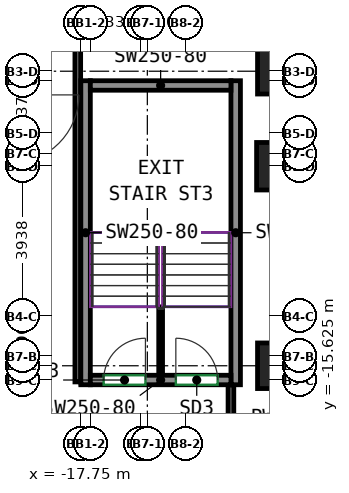
"""IFC4 building model, lengths in metres.
Left out: names, types, materials, properties, quantities, classifications, styles, units other than length and angle.
Written with IfcOpenShell. Run it as: python <this file> out.ifc"""

import sys

from ifc_helpers import new_model, si_unit, direction, frame, frame_2d, origin, origin_2d, place, context, subcontext, project, spatial, rectangle, extrude, source, transform, mapped, element, fill, save


model = new_model("IFC4")
c1 = context("Model", 3, precision=1e-05, world=origin(), true_north=direction((0.0, 1.0)))
c2 = subcontext(c1, "Body", "Model", "MODEL_VIEW")
j1 = project(units=[si_unit("LENGTHUNIT", "METRE"), si_unit("PLANEANGLEUNIT", "RADIAN")], contexts=[c1])
p1 = place(None, origin())
s1 = spatial("IfcSite", under=j1, at=p1, CompositionType="ELEMENT")
p2 = place(p1, origin())
s2 = spatial("IfcBuilding", under=s1, at=p2, CompositionType="ELEMENT")
p3 = place(p2, frame((0.0, 0.0, 95.2)))
s3 = spatial("IfcBuildingStorey", under=s2, at=p3, CompositionType="ELEMENT", Elevation=95.2)
m1 = source(origin(), c2, "Body", "SweptSolid", [
    extrude(rectangle(XDim=1.25, YDim=1.25, at=origin_2d()), origin(), (0.0, 0.0, 1.0), 3.5),
])
p4 = place(p3, frame((-12.5, -10.0, 0.0), z_axis=(0.0, 0.0, 1.0), x_axis=(1.0, 0.0, 0.0)))
e1 = element("IfcColumn", 1, at=p4, inside=s3, PredefinedType="COLUMN", context=c2, shape_type="MappedRepresentation", body=[
    mapped(m1, transform((0.0, 0.0, 0.0))),
])
m2 = source(origin(), c2, "Body", "SweptSolid", [
    extrude(rectangle(XDim=1.2, YDim=1.2, at=origin_2d()), origin(), (0.0, 0.0, 1.0), 5.0),
])
for number, where, z_axis, x_axis in (
    (2, (-12.5, -15.25, 0.0), (0.0, 0.0, 1.0), (1.0, 0.0, 0.0)),
    (3, (-12.5, -7.5, 0.0), (0.0, 0.0, 1.0), (1.0, 0.0, 0.0)),
):
    element("IfcColumn", number, at=place(p3, frame(where, z_axis=z_axis, x_axis=x_axis)), inside=s3, PredefinedType="COLUMN", context=c2, shape_type="MappedRepresentation", body=[
        mapped(m2, transform((0.0, 0.0, 0.0))),
    ])
m3 = source(origin(), c2, "Body", "SweptSolid", [
    extrude(rectangle(XDim=8.0, YDim=0.25, at=frame_2d((4.0, 0.0))), origin(), (0.0, 0.0, 1.0), 5.0),
])
for number, where, z_axis, x_axis in (
    (4, (-17.625, -15.75, 0.0), (0.0, 0.0, 1.0), (0.0, 1.0, 0.0)),
    (5, (-13.675, -15.75, 0.0), (0.0, 0.0, 1.0), (0.0, 1.0, 0.0)),
):
    element("IfcWall", number, at=place(p3, frame(where, z_axis=z_axis, x_axis=x_axis)), inside=s3, PredefinedType="SHEAR", context=c2, shape_type="MappedRepresentation", body=[
        mapped(m3, transform((0.0, 0.0, 0.0))),
    ])
m4 = source(origin(), c2, "Body", "SweptSolid", [
    extrude(rectangle(XDim=3.7, YDim=0.25, at=frame_2d((1.85, 0.0))), origin(), (0.0, 0.0, 1.0), 5.0),
])
p5 = place(p3, frame((-17.5, -15.625, 0.0), z_axis=(0.0, 0.0, 1.0), x_axis=(1.0, 0.0, 0.0)))
e6 = element("IfcWall", 6, at=p5, inside=s3, PredefinedType="SHEAR", context=c2, shape_type="MappedRepresentation", body=[
    mapped(m4, transform((0.0, 0.0, 0.0))),
])
p6 = place(p5, frame((0.35, 0.0, 0.0)))
e7 = element("IfcOpeningElement", 7, at=p6, cuts=e6, PredefinedType="OPENING", context=c2, shape_type="SweptSolid", body=[
    extrude(rectangle(XDim=1.1, YDim=2.1, at=frame_2d((0.55, 1.05))), frame((0.0, 0.135, 0.0), z_axis=(0.0, -1.0, 0.0), x_axis=(1.0, 0.0, 0.0)), (0.0, 0.0, 1.0), 0.27),
])
p7 = place(p5, frame((2.25, 0.0, 0.0)))
e8 = element("IfcOpeningElement", 8, at=p7, cuts=e6, PredefinedType="OPENING", context=c2, shape_type="SweptSolid", body=[
    extrude(rectangle(XDim=1.1, YDim=2.1, at=frame_2d((0.55, 1.05))), frame((0.0, 0.135, 0.0), z_axis=(0.0, -1.0, 0.0), x_axis=(1.0, 0.0, 0.0)), (0.0, 0.0, 1.0), 0.27),
])
p8 = place(p3, frame((-17.5, -7.875, 0.0), z_axis=(0.0, 0.0, 1.0), x_axis=(1.0, 0.0, 0.0)))
e9 = element("IfcWall", 9, at=p8, inside=s3, PredefinedType="SHEAR", context=c2, shape_type="MappedRepresentation", body=[
    mapped(m4, transform((0.0, 0.0, 0.0))),
])
m5 = source(origin(), c2, "Body", "SweptSolid", [
    extrude(rectangle(XDim=1.8, YDim=0.1, at=frame_2d((0.9, 0.0))), origin(), (0.0, 0.0, 1.0), 2.5),
])
p9 = place(p3, frame((-15.65, -15.5, 0.0), z_axis=(0.0, 0.0, 1.0), x_axis=(0.0, 1.0, 0.0)))
e10 = element("IfcWall", 10, at=p9, inside=s3, PredefinedType="PARTITIONING", context=c2, shape_type="MappedRepresentation", body=[
    mapped(m5, transform((0.0, 0.0, 0.0))),
])
p10 = place(p3, frame((-17.83, -15.675, 0.0), z_axis=(0.0, 0.0, 1.0), x_axis=(0.0, 1.0, 0.0)))
e11 = element("IfcWall", 11, at=p10, inside=s3, PredefinedType="PARTITIONING", context=c2, shape_type="SweptSolid", body=[
    extrude(rectangle(XDim=18.8, YDim=0.15, at=frame_2d((9.4, 0.0))), origin(), (0.0, 0.0, 1.0), 5.0),
])
p11 = place(p3, frame((-13.8, -17.475, 0.0), z_axis=(0.0, 0.0, 1.0), x_axis=(0.0, 1.0, 0.0)))
e12 = element("IfcWall", 12, at=p11, inside=s3, PredefinedType="PARTITIONING", context=c2, shape_type="SweptSolid", body=[
    extrude(rectangle(XDim=1.725, YDim=0.15, at=frame_2d((0.863, 0.0))), origin(), (0.0, 0.0, 1.0), 5.0),
])
p12 = place(p6, origin())
e13 = element("IfcDoor", 13, at=p12, inside=s3, OperationType="SINGLE_SWING_RIGHT", PredefinedType="DOOR", context=c2, shape_type="SweptSolid", body=[
    extrude(rectangle(XDim=1.1, YDim=2.1, at=frame_2d((0.55, 1.05))), frame((0.0, 0.025, 0.0), z_axis=(0.0, -1.0, 0.0), x_axis=(1.0, 0.0, 0.0)), (0.0, 0.0, 1.0), 0.05),
])
fill(e7, e13)
p13 = place(p7, origin())
e14 = element("IfcDoor", 14, at=p13, inside=s3, OperationType="SINGLE_SWING_LEFT", PredefinedType="DOOR", context=c2, shape_type="SweptSolid", body=[
    extrude(rectangle(XDim=1.1, YDim=2.1, at=frame_2d((0.55, 1.05))), frame((0.0, 0.025, 0.0), z_axis=(0.0, -1.0, 0.0), x_axis=(1.0, 0.0, 0.0)), (0.0, 0.0, 1.0), 0.05),
])
fill(e8, e14)
save(model, sys.argv[1])
